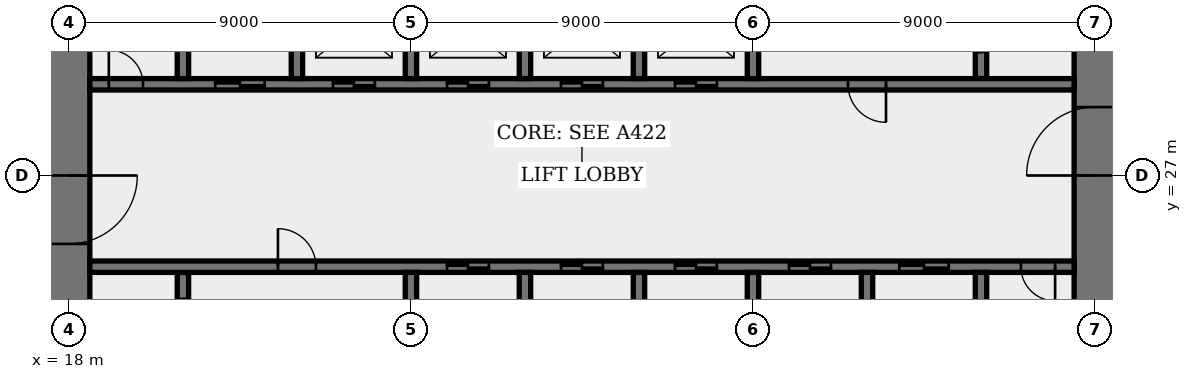
"""IFC4 building model, lengths in metres.
Left out: names, types, materials, properties, quantities, classifications, styles, units other than length and angle.
Written with IfcOpenShell. Run it as: python <this file> out.ifc"""

import sys

from ifc_helpers import new_model, si_unit, direction, frame, frame_2d, origin, place, context, subcontext, project, spatial, rectangle, extrude, element, fill, save


model = new_model("IFC4")
c1 = context("Model", 3, precision=1e-05, world=origin(), true_north=direction((0.0, 1.0)))
c2 = subcontext(c1, "Body", "Model", "MODEL_VIEW")
j1 = project(units=[si_unit("LENGTHUNIT", "METRE"), si_unit("PLANEANGLEUNIT", "RADIAN")], contexts=[c1])
p1 = place(None, origin())
s1 = spatial("IfcSite", under=j1, at=p1, CompositionType="ELEMENT")
p2 = place(p1, origin())
s2 = spatial("IfcBuilding", under=s1, at=p2, CompositionType="ELEMENT")
p3 = place(p2, origin())
s3 = spatial("IfcBuildingStorey", under=s2, at=p3, CompositionType="ELEMENT", Elevation=0.0)
p4 = place(p3, frame((18.0, 35.45, 0.0), z_axis=(0.0, 0.0, 1.0), x_axis=(0.0, -1.0, 0.0)))
e1 = element("IfcWall", 1, at=p4, inside=s3, PredefinedType="SHEAR", context=c2, shape_type="SweptSolid", body=[
    extrude(rectangle(XDim=16.9, YDim=1.1, at=frame_2d((8.45, 0.0))), origin(), (0.0, 0.0, 1.0), 5.4),
])
p5 = place(p4, frame((8.45, 0.0, 0.0)))
e2 = element("IfcOpeningElement", 2, at=p5, cuts=e1, PredefinedType="OPENING", context=c2, shape_type="SweptSolid", body=[
    extrude(rectangle(XDim=1.8, YDim=2.4, at=frame_2d((0.9, 1.2))), frame((0.0, 0.56, 0.0), z_axis=(0.0, -1.0, 0.0), x_axis=(1.0, 0.0, 0.0)), (0.0, 0.0, 1.0), 1.12),
])
p6 = place(p3, frame((45.0, 18.55, 0.0), z_axis=(0.0, 0.0, 1.0), x_axis=(0.0, 1.0, 0.0)))
e3 = element("IfcWall", 3, at=p6, inside=s3, PredefinedType="SHEAR", context=c2, shape_type="SweptSolid", body=[
    extrude(rectangle(XDim=16.9, YDim=1.1, at=frame_2d((8.45, 0.0))), origin(), (0.0, 0.0, 1.0), 5.4),
])
p7 = place(p6, frame((8.45, 0.0, 0.0)))
e4 = element("IfcOpeningElement", 4, at=p7, cuts=e3, PredefinedType="OPENING", context=c2, shape_type="SweptSolid", body=[
    extrude(rectangle(XDim=1.8, YDim=2.4, at=frame_2d((0.9, 1.2))), frame((0.0, 0.56, 0.0), z_axis=(0.0, -1.0, 0.0), x_axis=(1.0, 0.0, 0.0)), (0.0, 0.0, 1.0), 1.12),
])
p8 = place(p3, frame((21.0, 21.95, 0.0), z_axis=(0.0, 0.0, 1.0), x_axis=(0.0, 1.0, 0.0)))
e5 = element("IfcWall", 5, at=p8, inside=s3, PredefinedType="SHEAR", context=c2, shape_type="SweptSolid", body=[
    extrude(rectangle(XDim=2.5, YDim=0.3, at=frame_2d((1.25, 0.0))), origin(), (0.0, 0.0, 1.0), 5.4),
])
p9 = place(p8, frame((0.7, 0.0, 0.0)))
e6 = element("IfcOpeningElement", 6, at=p9, cuts=e5, PredefinedType="OPENING", context=c2, shape_type="SweptSolid", body=[
    extrude(rectangle(XDim=1.1, YDim=2.4, at=frame_2d((0.55, 1.2))), frame((0.0, 0.16, 0.0), z_axis=(0.0, -1.0, 0.0), x_axis=(1.0, 0.0, 0.0)), (0.0, 0.0, 1.0), 0.32),
])
p10 = place(p3, frame((42.0, 29.55, 0.0), z_axis=(0.0, 0.0, 1.0), x_axis=(0.0, 1.0, 0.0)))
e7 = element("IfcWall", 7, at=p10, inside=s3, PredefinedType="SHEAR", context=c2, shape_type="SweptSolid", body=[
    extrude(rectangle(XDim=2.5, YDim=0.3, at=frame_2d((1.25, 0.0))), origin(), (0.0, 0.0, 1.0), 5.4),
])
p11 = place(p10, frame((0.7, 0.0, 0.0)))
e8 = element("IfcOpeningElement", 8, at=p11, cuts=e7, PredefinedType="OPENING", context=c2, shape_type="SweptSolid", body=[
    extrude(rectangle(XDim=1.1, YDim=2.4, at=frame_2d((0.55, 1.2))), frame((0.0, 0.16, 0.0), z_axis=(0.0, -1.0, 0.0), x_axis=(1.0, 0.0, 0.0)), (0.0, 0.0, 1.0), 0.32),
])
p12 = place(p3, frame((18.55, 24.6, 0.0), z_axis=(0.0, 0.0, 1.0), x_axis=(1.0, 0.0, 0.0)))
e9 = element("IfcWall", 9, at=p12, inside=s3, PredefinedType="SHEAR", context=c2, shape_type="SweptSolid", body=[
    extrude(rectangle(XDim=25.9, YDim=0.3, at=frame_2d((12.95, 0.0))), origin(), (0.0, 0.0, 1.0), 5.4),
])
p13 = place(p12, frame((4.95, 0.0, 0.0)))
e10 = element("IfcOpeningElement", 10, at=p13, cuts=e9, PredefinedType="OPENING", context=c2, shape_type="SweptSolid", body=[
    extrude(rectangle(XDim=1.0, YDim=2.4, at=frame_2d((0.5, 1.2))), frame((0.0, 0.16, 0.0), z_axis=(0.0, -1.0, 0.0), x_axis=(1.0, 0.0, 0.0)), (0.0, 0.0, 1.0), 0.32),
])
p14 = place(p12, frame((24.5, 0.0, 0.0)))
e11 = element("IfcOpeningElement", 11, at=p14, cuts=e9, PredefinedType="OPENING", context=c2, shape_type="SweptSolid", body=[
    extrude(rectangle(XDim=0.9, YDim=2.1, at=frame_2d((0.45, 1.05))), frame((0.0, 0.16, 0.0), z_axis=(0.0, -1.0, 0.0), x_axis=(1.0, 0.0, 0.0)), (0.0, 0.0, 1.0), 0.32),
])
p15 = place(p12, frame((9.4, 0.0, 0.0)))
e12 = element("IfcOpeningElement", 12, at=p15, cuts=e9, PredefinedType="OPENING", context=c2, shape_type="SweptSolid", body=[
    extrude(rectangle(XDim=1.1, YDim=2.4, at=frame_2d((0.55, 1.2))), frame((0.0, 0.16, 0.0), z_axis=(0.0, -1.0, 0.0), x_axis=(1.0, 0.0, 0.0)), (0.0, 0.0, 1.0), 0.32),
])
p16 = place(p12, frame((12.4, 0.0, 0.0)))
e13 = element("IfcOpeningElement", 13, at=p16, cuts=e9, PredefinedType="OPENING", context=c2, shape_type="SweptSolid", body=[
    extrude(rectangle(XDim=1.1, YDim=2.4, at=frame_2d((0.55, 1.2))), frame((0.0, 0.16, 0.0), z_axis=(0.0, -1.0, 0.0), x_axis=(1.0, 0.0, 0.0)), (0.0, 0.0, 1.0), 0.32),
])
p17 = place(p12, frame((15.4, 0.0, 0.0)))
e14 = element("IfcOpeningElement", 14, at=p17, cuts=e9, PredefinedType="OPENING", context=c2, shape_type="SweptSolid", body=[
    extrude(rectangle(XDim=1.1, YDim=2.4, at=frame_2d((0.55, 1.2))), frame((0.0, 0.16, 0.0), z_axis=(0.0, -1.0, 0.0), x_axis=(1.0, 0.0, 0.0)), (0.0, 0.0, 1.0), 0.32),
])
p18 = place(p12, frame((18.4, 0.0, 0.0)))
e15 = element("IfcOpeningElement", 15, at=p18, cuts=e9, PredefinedType="OPENING", context=c2, shape_type="SweptSolid", body=[
    extrude(rectangle(XDim=1.1, YDim=2.4, at=frame_2d((0.55, 1.2))), frame((0.0, 0.16, 0.0), z_axis=(0.0, -1.0, 0.0), x_axis=(1.0, 0.0, 0.0)), (0.0, 0.0, 1.0), 0.32),
])
p19 = place(p12, frame((21.3, 0.0, 0.0)))
e16 = element("IfcOpeningElement", 16, at=p19, cuts=e9, PredefinedType="OPENING", context=c2, shape_type="SweptSolid", body=[
    extrude(rectangle(XDim=1.3, YDim=2.4, at=frame_2d((0.65, 1.2))), frame((0.0, 0.16, 0.0), z_axis=(0.0, -1.0, 0.0), x_axis=(1.0, 0.0, 0.0)), (0.0, 0.0, 1.0), 0.32),
])
p20 = place(p3, frame((18.55, 29.4, 0.0), z_axis=(0.0, 0.0, 1.0), x_axis=(1.0, 0.0, 0.0)))
e17 = element("IfcWall", 17, at=p20, inside=s3, PredefinedType="SHEAR", context=c2, shape_type="SweptSolid", body=[
    extrude(rectangle(XDim=25.9, YDim=0.3, at=frame_2d((12.95, 0.0))), origin(), (0.0, 0.0, 1.0), 5.4),
])
p21 = place(p20, frame((19.95, 0.0, 0.0)))
e18 = element("IfcOpeningElement", 18, at=p21, cuts=e17, PredefinedType="OPENING", context=c2, shape_type="SweptSolid", body=[
    extrude(rectangle(XDim=1.0, YDim=2.4, at=frame_2d((0.5, 1.2))), frame((0.0, 0.16, 0.0), z_axis=(0.0, -1.0, 0.0), x_axis=(1.0, 0.0, 0.0)), (0.0, 0.0, 1.0), 0.32),
])
p22 = place(p20, frame((0.5, 0.0, 0.0)))
e19 = element("IfcOpeningElement", 19, at=p22, cuts=e17, PredefinedType="OPENING", context=c2, shape_type="SweptSolid", body=[
    extrude(rectangle(XDim=0.9, YDim=2.1, at=frame_2d((0.45, 1.05))), frame((0.0, 0.16, 0.0), z_axis=(0.0, -1.0, 0.0), x_axis=(1.0, 0.0, 0.0)), (0.0, 0.0, 1.0), 0.32),
])
p23 = place(p20, frame((15.4, 0.0, 0.0)))
e20 = element("IfcOpeningElement", 20, at=p23, cuts=e17, PredefinedType="OPENING", context=c2, shape_type="SweptSolid", body=[
    extrude(rectangle(XDim=1.1, YDim=2.4, at=frame_2d((0.55, 1.2))), frame((0.0, 0.16, 0.0), z_axis=(0.0, -1.0, 0.0), x_axis=(1.0, 0.0, 0.0)), (0.0, 0.0, 1.0), 0.32),
])
p24 = place(p20, frame((12.4, 0.0, 0.0)))
e21 = element("IfcOpeningElement", 21, at=p24, cuts=e17, PredefinedType="OPENING", context=c2, shape_type="SweptSolid", body=[
    extrude(rectangle(XDim=1.1, YDim=2.4, at=frame_2d((0.55, 1.2))), frame((0.0, 0.16, 0.0), z_axis=(0.0, -1.0, 0.0), x_axis=(1.0, 0.0, 0.0)), (0.0, 0.0, 1.0), 0.32),
])
p25 = place(p20, frame((9.4, 0.0, 0.0)))
e22 = element("IfcOpeningElement", 22, at=p25, cuts=e17, PredefinedType="OPENING", context=c2, shape_type="SweptSolid", body=[
    extrude(rectangle(XDim=1.1, YDim=2.4, at=frame_2d((0.55, 1.2))), frame((0.0, 0.16, 0.0), z_axis=(0.0, -1.0, 0.0), x_axis=(1.0, 0.0, 0.0)), (0.0, 0.0, 1.0), 0.32),
])
p26 = place(p20, frame((6.4, 0.0, 0.0)))
e23 = element("IfcOpeningElement", 23, at=p26, cuts=e17, PredefinedType="OPENING", context=c2, shape_type="SweptSolid", body=[
    extrude(rectangle(XDim=1.1, YDim=2.4, at=frame_2d((0.55, 1.2))), frame((0.0, 0.16, 0.0), z_axis=(0.0, -1.0, 0.0), x_axis=(1.0, 0.0, 0.0)), (0.0, 0.0, 1.0), 0.32),
])
p27 = place(p20, frame((3.3, 0.0, 0.0)))
e24 = element("IfcOpeningElement", 24, at=p27, cuts=e17, PredefinedType="OPENING", context=c2, shape_type="SweptSolid", body=[
    extrude(rectangle(XDim=1.3, YDim=2.4, at=frame_2d((0.65, 1.2))), frame((0.0, 0.16, 0.0), z_axis=(0.0, -1.0, 0.0), x_axis=(1.0, 0.0, 0.0)), (0.0, 0.0, 1.0), 0.32),
])
for number, where, z_axis, x_axis in (
    (25, (30.0, 21.75, 0.0), (0.0, 0.0, 1.0), (0.0, 1.0, 0.0)),
    (26, (33.0, 29.55, 0.0), (0.0, 0.0, 1.0), (0.0, 1.0, 0.0)),
    (27, (33.0, 21.75, 0.0), (0.0, 0.0, 1.0), (0.0, 1.0, 0.0)),
    (28, (30.0, 29.55, 0.0), (0.0, 0.0, 1.0), (0.0, 1.0, 0.0)),
    (29, (36.0, 21.75, 0.0), (0.0, 0.0, 1.0), (0.0, 1.0, 0.0)),
    (30, (27.0, 29.55, 0.0), (0.0, 0.0, 1.0), (0.0, 1.0, 0.0)),
):
    element("IfcWall", number, at=place(p3, frame(where, z_axis=z_axis, x_axis=x_axis)), inside=s3, PredefinedType="SHEAR", context=c2, shape_type="SweptSolid", body=[
        extrude(rectangle(XDim=2.7, YDim=0.3, at=frame_2d((1.35, 0.0))), origin(), (0.0, 0.0, 1.0), 5.4),
    ])
for number, where, z_axis, x_axis in (
    (31, (39.0, 18.55, 0.0), (0.0, 0.0, 1.0), (0.0, 1.0, 0.0)),
    (32, (24.0, 29.55, 0.0), (0.0, 0.0, 1.0), (0.0, 1.0, 0.0)),
):
    element("IfcWall", number, at=place(p3, frame(where, z_axis=z_axis, x_axis=x_axis)), inside=s3, PredefinedType="SHEAR", context=c2, shape_type="SweptSolid", body=[
        extrude(rectangle(XDim=5.9, YDim=0.3, at=frame_2d((2.95, 0.0))), origin(), (0.0, 0.0, 1.0), 5.4),
    ])
for number, where, z_axis, x_axis in (
    (33, (42.0, 21.75, 0.0), (0.0, 0.0, 1.0), (0.0, 1.0, 0.0)),
    (34, (21.0, 29.55, 0.0), (0.0, 0.0, 1.0), (0.0, 1.0, 0.0)),
):
    element("IfcWall", number, at=place(p3, frame(where, z_axis=z_axis, x_axis=x_axis)), inside=s3, PredefinedType="SHEAR", context=c2, shape_type="SweptSolid", body=[
        extrude(rectangle(XDim=2.7, YDim=0.3, at=frame_2d((1.35, 0.0))), origin(), (0.0, 0.0, 1.0), 5.4),
    ])
for number, where, z_axis, x_axis in (
    (35, (27.0, 21.6, 0.0), (0.0, 0.0, 1.0), (0.0, 1.0, 0.0)),
    (36, (36.0, 29.55, 0.0), (0.0, 0.0, 1.0), (0.0, 1.0, 0.0)),
):
    element("IfcWall", number, at=place(p3, frame(where, z_axis=z_axis, x_axis=x_axis)), inside=s3, PredefinedType="SHEAR", context=c2, shape_type="SweptSolid", body=[
        extrude(rectangle(XDim=2.85, YDim=0.3, at=frame_2d((1.425, 0.0))), origin(), (0.0, 0.0, 1.0), 5.4),
    ])
p28 = place(p5, origin())
e37 = element("IfcDoor", 37, at=p28, inside=s3, OperationType="DOUBLE_DOOR_DOUBLE_SWING", PredefinedType="DOOR", context=c2, shape_type="SweptSolid", body=[
    extrude(rectangle(XDim=1.8, YDim=2.4, at=frame_2d((0.9, 1.2))), frame((0.0, 0.03, 0.0), z_axis=(0.0, -1.0, 0.0), x_axis=(1.0, 0.0, 0.0)), (0.0, 0.0, 1.0), 0.06),
    extrude(rectangle(XDim=0.04, YDim=2.4, at=frame_2d((0.02, 1.2))), frame((0.0, 0.55, 0.0), z_axis=(0.0, -1.0, 0.0), x_axis=(1.0, 0.0, 0.0)), (0.0, 0.0, 1.0), 1.1),
    extrude(rectangle(XDim=0.04, YDim=2.4, at=frame_2d((1.78, 1.2))), frame((0.0, 0.55, 0.0), z_axis=(0.0, -1.0, 0.0), x_axis=(1.0, 0.0, 0.0)), (0.0, 0.0, 1.0), 1.1),
    extrude(rectangle(XDim=1.8, YDim=0.04, at=frame_2d((0.9, 2.38))), frame((0.0, 0.55, 0.0), z_axis=(0.0, -1.0, 0.0), x_axis=(1.0, 0.0, 0.0)), (0.0, 0.0, 1.0), 1.1),
])
fill(e2, e37)
p29 = place(p7, origin())
e38 = element("IfcDoor", 38, at=p29, inside=s3, OperationType="DOUBLE_DOOR_DOUBLE_SWING", PredefinedType="DOOR", context=c2, shape_type="SweptSolid", body=[
    extrude(rectangle(XDim=1.8, YDim=2.4, at=frame_2d((0.9, 1.2))), frame((0.0, 0.03, 0.0), z_axis=(0.0, -1.0, 0.0), x_axis=(1.0, 0.0, 0.0)), (0.0, 0.0, 1.0), 0.06),
    extrude(rectangle(XDim=0.04, YDim=2.4, at=frame_2d((0.02, 1.2))), frame((0.0, 0.55, 0.0), z_axis=(0.0, -1.0, 0.0), x_axis=(1.0, 0.0, 0.0)), (0.0, 0.0, 1.0), 1.1),
    extrude(rectangle(XDim=0.04, YDim=2.4, at=frame_2d((1.78, 1.2))), frame((0.0, 0.55, 0.0), z_axis=(0.0, -1.0, 0.0), x_axis=(1.0, 0.0, 0.0)), (0.0, 0.0, 1.0), 1.1),
    extrude(rectangle(XDim=1.8, YDim=0.04, at=frame_2d((0.9, 2.38))), frame((0.0, 0.55, 0.0), z_axis=(0.0, -1.0, 0.0), x_axis=(1.0, 0.0, 0.0)), (0.0, 0.0, 1.0), 1.1),
])
fill(e4, e38)
p30 = place(p13, origin())
e39 = element("IfcDoor", 39, at=p30, inside=s3, OperationType="SINGLE_SWING_RIGHT", PredefinedType="DOOR", context=c2, shape_type="SweptSolid", body=[
    extrude(rectangle(XDim=1.0, YDim=2.4, at=frame_2d((0.5, 1.2))), frame((0.0, 0.03, 0.0), z_axis=(0.0, -1.0, 0.0), x_axis=(1.0, 0.0, 0.0)), (0.0, 0.0, 1.0), 0.06),
])
fill(e10, e39)
p31 = place(p21, origin())
e40 = element("IfcDoor", 40, at=p31, inside=s3, OperationType="SINGLE_SWING_RIGHT", PredefinedType="DOOR", context=c2, shape_type="SweptSolid", body=[
    extrude(rectangle(XDim=1.0, YDim=2.4, at=frame_2d((0.5, 1.2))), frame((0.0, 0.03, 0.0), z_axis=(0.0, -1.0, 0.0), x_axis=(1.0, 0.0, 0.0)), (0.0, 0.0, 1.0), 0.06),
])
fill(e18, e40)
p32 = place(p14, origin())
e41 = element("IfcDoor", 41, at=p32, inside=s3, OperationType="SINGLE_SWING_RIGHT", PredefinedType="DOOR", context=c2, shape_type="SweptSolid", body=[
    extrude(rectangle(XDim=0.9, YDim=2.1, at=frame_2d((0.45, 1.05))), frame((0.0, 0.03, 0.0), z_axis=(0.0, -1.0, 0.0), x_axis=(1.0, 0.0, 0.0)), (0.0, 0.0, 1.0), 0.06),
])
fill(e11, e41)
p33 = place(p22, origin())
e42 = element("IfcDoor", 42, at=p33, inside=s3, OperationType="SINGLE_SWING_RIGHT", PredefinedType="DOOR", context=c2, shape_type="SweptSolid", body=[
    extrude(rectangle(XDim=0.9, YDim=2.1, at=frame_2d((0.45, 1.05))), frame((0.0, 0.03, 0.0), z_axis=(0.0, -1.0, 0.0), x_axis=(1.0, 0.0, 0.0)), (0.0, 0.0, 1.0), 0.06),
])
fill(e19, e42)
p34 = place(p15, origin())
e43 = element("IfcDoor", 43, at=p34, inside=s3, OperationType="DOUBLE_DOOR_SLIDING", PredefinedType="DOOR", context=c2, shape_type="SweptSolid", body=[
    extrude(rectangle(XDim=1.1, YDim=2.4, at=frame_2d((0.55, 1.2))), frame((0.0, 0.02, 0.0), z_axis=(0.0, -1.0, 0.0), x_axis=(1.0, 0.0, 0.0)), (0.0, 0.0, 1.0), 0.04),
])
fill(e12, e43)
p35 = place(p16, origin())
e44 = element("IfcDoor", 44, at=p35, inside=s3, OperationType="DOUBLE_DOOR_SLIDING", PredefinedType="DOOR", context=c2, shape_type="SweptSolid", body=[
    extrude(rectangle(XDim=1.1, YDim=2.4, at=frame_2d((0.55, 1.2))), frame((0.0, 0.02, 0.0), z_axis=(0.0, -1.0, 0.0), x_axis=(1.0, 0.0, 0.0)), (0.0, 0.0, 1.0), 0.04),
])
fill(e13, e44)
p36 = place(p17, origin())
e45 = element("IfcDoor", 45, at=p36, inside=s3, OperationType="DOUBLE_DOOR_SLIDING", PredefinedType="DOOR", context=c2, shape_type="SweptSolid", body=[
    extrude(rectangle(XDim=1.1, YDim=2.4, at=frame_2d((0.55, 1.2))), frame((0.0, 0.02, 0.0), z_axis=(0.0, -1.0, 0.0), x_axis=(1.0, 0.0, 0.0)), (0.0, 0.0, 1.0), 0.04),
])
fill(e14, e45)
p37 = place(p18, origin())
e46 = element("IfcDoor", 46, at=p37, inside=s3, OperationType="DOUBLE_DOOR_SLIDING", PredefinedType="DOOR", context=c2, shape_type="SweptSolid", body=[
    extrude(rectangle(XDim=1.1, YDim=2.4, at=frame_2d((0.55, 1.2))), frame((0.0, 0.02, 0.0), z_axis=(0.0, -1.0, 0.0), x_axis=(1.0, 0.0, 0.0)), (0.0, 0.0, 1.0), 0.04),
])
fill(e15, e46)
p38 = place(p23, origin())
e47 = element("IfcDoor", 47, at=p38, inside=s3, OperationType="DOUBLE_DOOR_SLIDING", PredefinedType="DOOR", context=c2, shape_type="SweptSolid", body=[
    extrude(rectangle(XDim=1.1, YDim=2.4, at=frame_2d((0.55, 1.2))), frame((0.0, 0.02, 0.0), z_axis=(0.0, -1.0, 0.0), x_axis=(1.0, 0.0, 0.0)), (0.0, 0.0, 1.0), 0.04),
])
fill(e20, e47)
p39 = place(p24, origin())
e48 = element("IfcDoor", 48, at=p39, inside=s3, OperationType="DOUBLE_DOOR_SLIDING", PredefinedType="DOOR", context=c2, shape_type="SweptSolid", body=[
    extrude(rectangle(XDim=1.1, YDim=2.4, at=frame_2d((0.55, 1.2))), frame((0.0, 0.02, 0.0), z_axis=(0.0, -1.0, 0.0), x_axis=(1.0, 0.0, 0.0)), (0.0, 0.0, 1.0), 0.04),
])
fill(e21, e48)
p40 = place(p25, origin())
e49 = element("IfcDoor", 49, at=p40, inside=s3, OperationType="DOUBLE_DOOR_SLIDING", PredefinedType="DOOR", context=c2, shape_type="SweptSolid", body=[
    extrude(rectangle(XDim=1.1, YDim=2.4, at=frame_2d((0.55, 1.2))), frame((0.0, 0.02, 0.0), z_axis=(0.0, -1.0, 0.0), x_axis=(1.0, 0.0, 0.0)), (0.0, 0.0, 1.0), 0.04),
])
fill(e22, e49)
p41 = place(p26, origin())
e50 = element("IfcDoor", 50, at=p41, inside=s3, OperationType="DOUBLE_DOOR_SLIDING", PredefinedType="DOOR", context=c2, shape_type="SweptSolid", body=[
    extrude(rectangle(XDim=1.1, YDim=2.4, at=frame_2d((0.55, 1.2))), frame((0.0, 0.02, 0.0), z_axis=(0.0, -1.0, 0.0), x_axis=(1.0, 0.0, 0.0)), (0.0, 0.0, 1.0), 0.04),
])
fill(e23, e50)
p42 = place(p19, origin())
e51 = element("IfcDoor", 51, at=p42, inside=s3, OperationType="DOUBLE_DOOR_SLIDING", PredefinedType="DOOR", context=c2, shape_type="SweptSolid", body=[
    extrude(rectangle(XDim=1.3, YDim=2.4, at=frame_2d((0.65, 1.2))), frame((0.0, 0.02, 0.0), z_axis=(0.0, -1.0, 0.0), x_axis=(1.0, 0.0, 0.0)), (0.0, 0.0, 1.0), 0.04),
])
fill(e16, e51)
p43 = place(p27, origin())
e52 = element("IfcDoor", 52, at=p43, inside=s3, OperationType="DOUBLE_DOOR_SLIDING", PredefinedType="DOOR", context=c2, shape_type="SweptSolid", body=[
    extrude(rectangle(XDim=1.3, YDim=2.4, at=frame_2d((0.65, 1.2))), frame((0.0, 0.02, 0.0), z_axis=(0.0, -1.0, 0.0), x_axis=(1.0, 0.0, 0.0)), (0.0, 0.0, 1.0), 0.04),
])
fill(e24, e52)
save(model, sys.argv[1])
